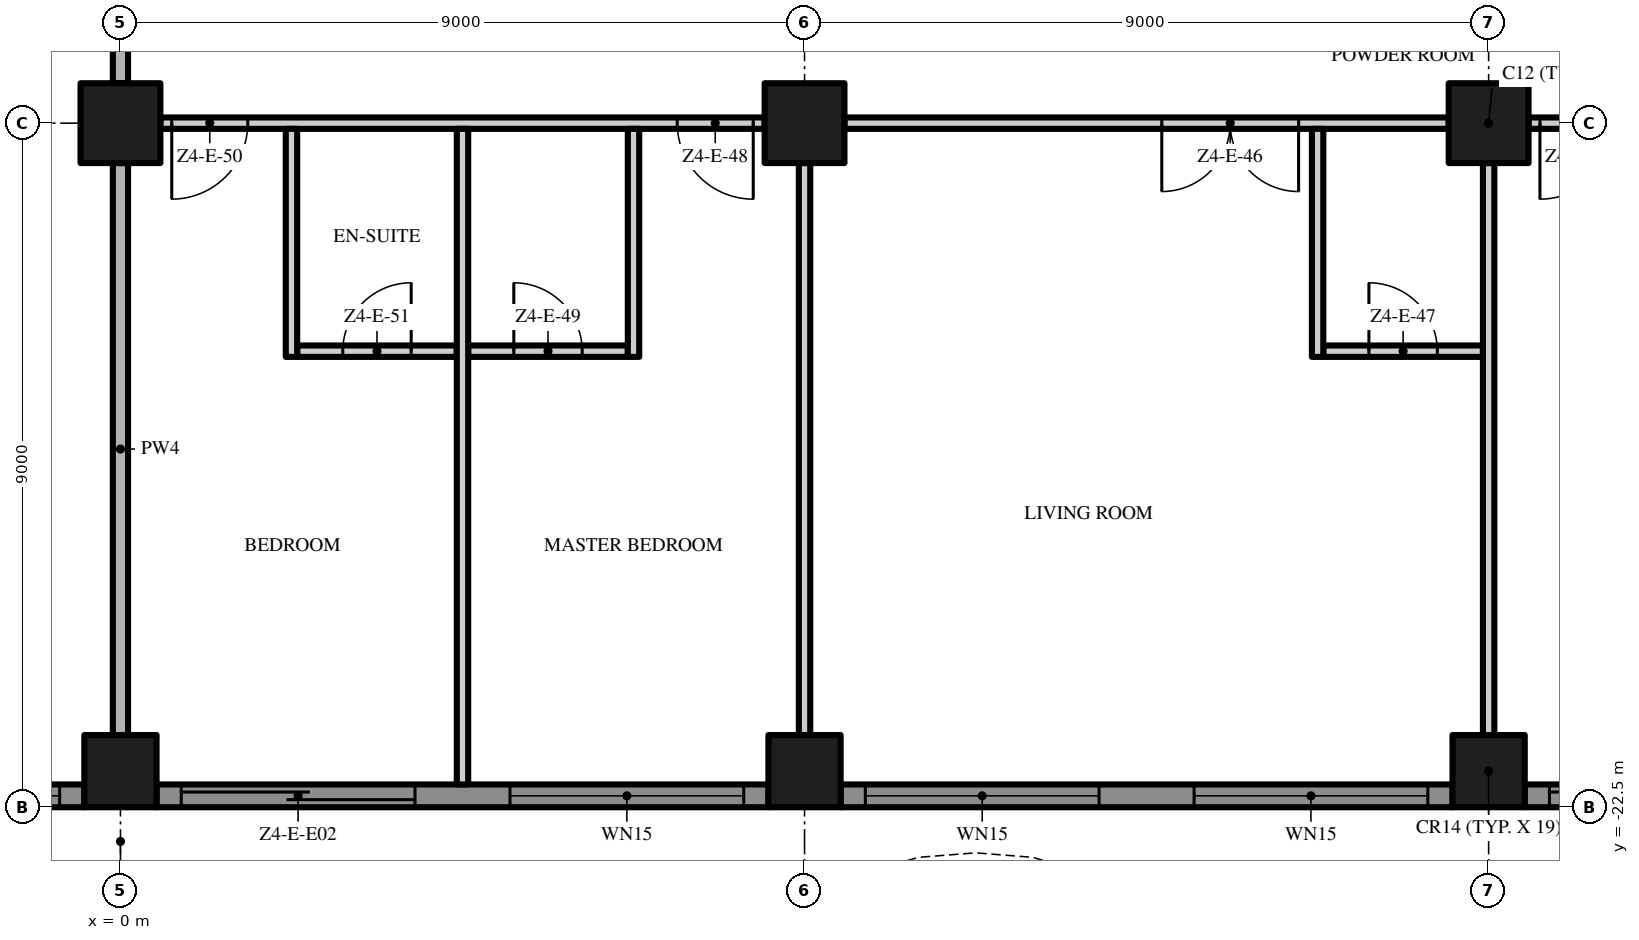
"""IFC4 building model, lengths in metres.
Left out: names, types, materials, properties, quantities, classifications, styles, units other than length and angle.
Written with IfcOpenShell. Run it as: python <this file> out.ifc"""

import sys

from ifc_helpers import new_model, si_unit, direction, frame, frame_2d, origin, origin_2d, place, context, subcontext, project, spatial, polyline, rectangle, outline, extrude, element, fill, save


model = new_model("IFC4")
c1 = context("Model", 3, precision=1e-05, world=origin(), true_north=direction((0.0, 1.0)))
c2 = subcontext(c1, "Body", "Model", "MODEL_VIEW")
j1 = project(units=[si_unit("LENGTHUNIT", "METRE"), si_unit("PLANEANGLEUNIT", "RADIAN")], contexts=[c1])
p1 = place(None, origin())
s1 = spatial("IfcSite", under=j1, at=p1, CompositionType="ELEMENT")
p2 = place(p1, origin())
s2 = spatial("IfcBuilding", under=s1, at=p2, CompositionType="ELEMENT")
p3 = place(p2, frame((0.0, 0.0, 226.2)))
s3 = spatial("IfcBuildingStorey", under=s2, at=p3, CompositionType="ELEMENT", Elevation=226.2)
p4 = place(p3, frame((0.0, -13.5, 0.0), z_axis=(0.0, 0.0, 1.0), x_axis=(1.0, 0.0, 0.0)))
e1 = element("IfcColumn", 1, at=p4, inside=s3, PredefinedType="COLUMN", context=c2, shape_type="SweptSolid", body=[
    extrude(rectangle(XDim=1.05, YDim=1.05, at=origin_2d()), origin(), (0.0, 0.0, 1.0), 3.5),
])
p5 = place(p3, frame((0.0, -22.025, 0.0), z_axis=(0.0, 0.0, 1.0), x_axis=(1.0, 0.0, 0.0)))
e2 = element("IfcColumn", 2, at=p5, inside=s3, PredefinedType="COLUMN", context=c2, shape_type="SweptSolid", body=[
    extrude(rectangle(XDim=0.95, YDim=0.95, at=origin_2d()), origin(), (0.0, 0.0, 1.0), 3.5),
])
p6 = place(p3, frame((18.0, -13.5, 0.0), z_axis=(0.0, 0.0, 1.0), x_axis=(1.0, 0.0, 0.0)))
e3 = element("IfcColumn", 3, at=p6, inside=s3, PredefinedType="COLUMN", context=c2, shape_type="SweptSolid", body=[
    extrude(rectangle(XDim=1.05, YDim=1.05, at=origin_2d()), origin(), (0.0, 0.0, 1.0), 3.5),
])
p7 = place(p3, frame((18.0, -22.025, 0.0), z_axis=(0.0, 0.0, 1.0), x_axis=(1.0, 0.0, 0.0)))
e4 = element("IfcColumn", 4, at=p7, inside=s3, PredefinedType="COLUMN", context=c2, shape_type="SweptSolid", body=[
    extrude(rectangle(XDim=0.95, YDim=0.95, at=origin_2d()), origin(), (0.0, 0.0, 1.0), 3.5),
])
p8 = place(p3, frame((9.0, -13.5, 0.0), z_axis=(0.0, 0.0, 1.0), x_axis=(1.0, 0.0, 0.0)))
e5 = element("IfcColumn", 5, at=p8, inside=s3, PredefinedType="COLUMN", context=c2, shape_type="SweptSolid", body=[
    extrude(rectangle(XDim=1.05, YDim=1.05, at=origin_2d()), origin(), (0.0, 0.0, 1.0), 3.5),
])
p9 = place(p3, frame((9.0, -22.025, 0.0), z_axis=(0.0, 0.0, 1.0), x_axis=(1.0, 0.0, 0.0)))
e6 = element("IfcColumn", 6, at=p9, inside=s3, PredefinedType="COLUMN", context=c2, shape_type="SweptSolid", body=[
    extrude(rectangle(XDim=0.95, YDim=0.95, at=origin_2d()), origin(), (0.0, 0.0, 1.0), 3.5),
])
p10 = place(p3, frame((-0.475, -22.35, 0.0), z_axis=(0.0, 0.0, 1.0), x_axis=(-1.0, 0.0, 0.0)))
e7 = element("IfcWall", 7, at=p10, inside=s3, PredefinedType="SOLIDWALL", context=c2, shape_type="SweptSolid", body=[
    extrude(rectangle(XDim=8.05, YDim=0.3, at=frame_2d((4.025, 0.0))), origin(), (0.0, 0.0, 1.0), 3.5),
])
p11 = place(p10, frame((4.65, 0.0, 0.45)))
e8 = element("IfcOpeningElement", 8, at=p11, cuts=e7, PredefinedType="OPENING", context=c2, shape_type="SweptSolid", body=[
    extrude(rectangle(XDim=3.075, YDim=2.65, at=frame_2d((1.538, 1.325))), frame((0.0, 0.16, 0.0), z_axis=(0.0, -1.0, 0.0), x_axis=(1.0, 0.0, 0.0)), (0.0, 0.0, 1.0), 0.32),
])
p12 = place(p10, frame((0.325, 0.0, 0.45)))
e9 = element("IfcOpeningElement", 9, at=p12, cuts=e7, PredefinedType="OPENING", context=c2, shape_type="SweptSolid", body=[
    extrude(rectangle(XDim=3.075, YDim=2.65, at=frame_2d((1.538, 1.325))), frame((0.0, 0.16, 0.0), z_axis=(0.0, -1.0, 0.0), x_axis=(1.0, 0.0, 0.0)), (0.0, 0.0, 1.0), 0.32),
])
p13 = place(p3, frame((8.525, -22.35, 0.0), z_axis=(0.0, 0.0, 1.0), x_axis=(-1.0, 0.0, 0.0)))
e10 = element("IfcWall", 10, at=p13, inside=s3, PredefinedType="SOLIDWALL", context=c2, shape_type="SweptSolid", body=[
    extrude(rectangle(XDim=8.05, YDim=0.3, at=frame_2d((4.025, 0.0))), origin(), (0.0, 0.0, 1.0), 3.5),
])
p14 = place(p13, frame((4.65, 0.0, 0.0)))
e11 = element("IfcOpeningElement", 11, at=p14, cuts=e10, PredefinedType="OPENING", context=c2, shape_type="SweptSolid", body=[
    extrude(rectangle(XDim=3.075, YDim=2.4, at=frame_2d((1.538, 1.2))), frame((0.0, 0.16, 0.0), z_axis=(0.0, -1.0, 0.0), x_axis=(1.0, 0.0, 0.0)), (0.0, 0.0, 1.0), 0.32),
])
p15 = place(p13, frame((0.325, 0.0, 0.45)))
e12 = element("IfcOpeningElement", 12, at=p15, cuts=e10, PredefinedType="OPENING", context=c2, shape_type="SweptSolid", body=[
    extrude(rectangle(XDim=3.075, YDim=2.65, at=frame_2d((1.538, 1.325))), frame((0.0, 0.16, 0.0), z_axis=(0.0, -1.0, 0.0), x_axis=(1.0, 0.0, 0.0)), (0.0, 0.0, 1.0), 0.32),
])
p16 = place(p3, frame((17.525, -22.35, 0.0), z_axis=(0.0, 0.0, 1.0), x_axis=(-1.0, 0.0, 0.0)))
e13 = element("IfcWall", 13, at=p16, inside=s3, PredefinedType="SOLIDWALL", context=c2, shape_type="SweptSolid", body=[
    extrude(rectangle(XDim=8.05, YDim=0.3, at=frame_2d((4.025, 0.0))), origin(), (0.0, 0.0, 1.0), 3.5),
])
p17 = place(p16, frame((4.65, 0.0, 0.45)))
e14 = element("IfcOpeningElement", 14, at=p17, cuts=e13, PredefinedType="OPENING", context=c2, shape_type="SweptSolid", body=[
    extrude(rectangle(XDim=3.075, YDim=2.65, at=frame_2d((1.538, 1.325))), frame((0.0, 0.16, 0.0), z_axis=(0.0, -1.0, 0.0), x_axis=(1.0, 0.0, 0.0)), (0.0, 0.0, 1.0), 0.32),
])
p18 = place(p16, frame((0.325, 0.0, 0.45)))
e15 = element("IfcOpeningElement", 15, at=p18, cuts=e13, PredefinedType="OPENING", context=c2, shape_type="SweptSolid", body=[
    extrude(rectangle(XDim=3.075, YDim=2.65, at=frame_2d((1.538, 1.325))), frame((0.0, 0.16, 0.0), z_axis=(0.0, -1.0, 0.0), x_axis=(1.0, 0.0, 0.0)), (0.0, 0.0, 1.0), 0.32),
])
p19 = place(p3, frame((22.5, -22.35, 0.0), z_axis=(0.0, 0.0, 1.0), x_axis=(-1.0, 0.0, 0.0)))
e16 = element("IfcWall", 16, at=p19, inside=s3, PredefinedType="SOLIDWALL", context=c2, shape_type="SweptSolid", body=[
    extrude(rectangle(XDim=4.025, YDim=0.3, at=frame_2d((2.013, 0.0))), origin(), (0.0, 0.0, 1.0), 3.5),
])
p20 = place(p19, frame((0.625, 0.0, 0.0)))
e17 = element("IfcOpeningElement", 17, at=p20, cuts=e16, PredefinedType="OPENING", context=c2, shape_type="SweptSolid", body=[
    extrude(rectangle(XDim=3.075, YDim=2.4, at=frame_2d((1.538, 1.2))), frame((0.0, 0.16, 0.0), z_axis=(0.0, -1.0, 0.0), x_axis=(1.0, 0.0, 0.0)), (0.0, 0.0, 1.0), 0.32),
])
p21 = place(p3, origin())
e18 = element("IfcWall", 18, at=p21, inside=s3, PredefinedType="USERDEFINED", context=c2, shape_type="SweptSolid", body=[
    extrude(outline(polyline([(-22.5, -24.3), (-21.0, -23.595), (-19.5, -23.159), (-18.75, -23.1), (-18.0, -23.159), (-16.5, -23.595), (-15.0, -24.3), (-13.5, -25.005), (-12.0, -25.441), (-11.25, -25.5), (-10.5, -25.441), (-9.0, -25.005), (-7.5, -24.3), (-6.0, -23.595), (-4.5, -23.159), (-3.75, -23.1), (-3.0, -23.159), (-1.5, -23.595), (0.0, -24.3), (1.5, -25.005), (3.0, -25.441), (3.75, -25.5), (4.5, -25.441), (6.0, -25.005), (7.5, -24.3), (9.0, -23.595), (10.5, -23.159), (11.25, -23.1), (12.0, -23.159), (13.5, -23.595), (15.0, -24.3), (16.5, -25.005), (18.0, -25.441), (18.75, -25.5), (19.5, -25.441), (21.0, -25.005), (22.5, -24.3), (22.394, -24.074), (20.911, -24.771), (19.455, -25.194), (18.75, -25.249), (18.045, -25.194), (16.589, -24.771), (15.106, -24.074), (13.589, -23.36), (12.045, -22.911), (11.25, -22.849), (10.455, -22.911), (8.911, -23.36), (7.394, -24.074), (5.911, -24.771), (4.455, -25.194), (3.75, -25.249), (3.045, -25.194), (1.589, -24.771), (0.106, -24.074), (-1.411, -23.36), (-2.955, -22.911), (-3.75, -22.849), (-4.545, -22.911), (-6.089, -23.36), (-7.606, -24.074), (-9.089, -24.771), (-10.545, -25.194), (-11.25, -25.249), (-11.955, -25.194), (-13.411, -24.771), (-14.894, -24.074), (-16.411, -23.36), (-17.955, -22.911), (-18.75, -22.849), (-19.545, -22.911), (-21.089, -23.36), (-22.606, -24.074), (-22.5, -24.3)])), origin(), (0.0, 0.0, 1.0), 0.9),
])
p22 = place(p3, frame((2.325, -16.5, 0.0), z_axis=(0.0, 0.0, 1.0), x_axis=(1.0, 0.0, 0.0)))
e19 = element("IfcWall", 19, at=p22, inside=s3, PredefinedType="PARTITIONING", context=c2, shape_type="SweptSolid", body=[
    extrude(rectangle(XDim=2.1, YDim=0.15, at=frame_2d((1.05, 0.0))), origin(), (0.0, 0.0, 1.0), 3.5),
])
p23 = place(p22, frame((0.6, 0.0, 0.0)))
e20 = element("IfcOpeningElement", 20, at=p23, cuts=e19, PredefinedType="OPENING", context=c2, shape_type="SweptSolid", body=[
    extrude(rectangle(XDim=0.9, YDim=2.1, at=frame_2d((0.45, 1.05))), frame((0.0, 0.085, 0.0), z_axis=(0.0, -1.0, 0.0), x_axis=(1.0, 0.0, 0.0)), (0.0, 0.0, 1.0), 0.17),
])
p24 = place(p3, frame((4.575, -16.5, 0.0), z_axis=(0.0, 0.0, 1.0), x_axis=(1.0, 0.0, 0.0)))
e21 = element("IfcWall", 21, at=p24, inside=s3, PredefinedType="PARTITIONING", context=c2, shape_type="SweptSolid", body=[
    extrude(rectangle(XDim=2.1, YDim=0.15, at=frame_2d((1.05, 0.0))), origin(), (0.0, 0.0, 1.0), 3.5),
])
p25 = place(p24, frame((0.6, 0.0, 0.0)))
e22 = element("IfcOpeningElement", 22, at=p25, cuts=e21, PredefinedType="OPENING", context=c2, shape_type="SweptSolid", body=[
    extrude(rectangle(XDim=0.9, YDim=2.1, at=frame_2d((0.45, 1.05))), frame((0.0, 0.085, 0.0), z_axis=(0.0, -1.0, 0.0), x_axis=(1.0, 0.0, 0.0)), (0.0, 0.0, 1.0), 0.17),
])
p26 = place(p3, frame((15.825, -16.5, 0.0), z_axis=(0.0, 0.0, 1.0), x_axis=(1.0, 0.0, 0.0)))
e23 = element("IfcWall", 23, at=p26, inside=s3, PredefinedType="PARTITIONING", context=c2, shape_type="SweptSolid", body=[
    extrude(rectangle(XDim=2.1, YDim=0.15, at=frame_2d((1.05, 0.0))), origin(), (0.0, 0.0, 1.0), 3.5),
])
p27 = place(p26, frame((0.6, 0.0, 0.0)))
e24 = element("IfcOpeningElement", 24, at=p27, cuts=e23, PredefinedType="OPENING", context=c2, shape_type="SweptSolid", body=[
    extrude(rectangle(XDim=0.9, YDim=2.1, at=frame_2d((0.45, 1.05))), frame((0.0, 0.085, 0.0), z_axis=(0.0, -1.0, 0.0), x_axis=(1.0, 0.0, 0.0)), (0.0, 0.0, 1.0), 0.17),
])
p28 = place(p3, frame((8.475, -13.5, 0.0), z_axis=(0.0, 0.0, 1.0), x_axis=(-1.0, 0.0, 0.0)))
e25 = element("IfcWall", 25, at=p28, inside=s3, PredefinedType="PARTITIONING", context=c2, shape_type="SweptSolid", body=[
    extrude(rectangle(XDim=7.95, YDim=0.15, at=frame_2d((3.975, 0.0))), origin(), (0.0, 0.0, 1.0), 3.5),
])
p29 = place(p28, frame((0.15, 0.0, 0.0)))
e26 = element("IfcOpeningElement", 26, at=p29, cuts=e25, PredefinedType="OPENING", context=c2, shape_type="SweptSolid", body=[
    extrude(rectangle(XDim=1.0, YDim=2.4, at=frame_2d((0.5, 1.2))), frame((0.0, 0.085, 0.0), z_axis=(0.0, -1.0, 0.0), x_axis=(1.0, 0.0, 0.0)), (0.0, 0.0, 1.0), 0.17),
])
p30 = place(p28, frame((6.8, 0.0, 0.0)))
e27 = element("IfcOpeningElement", 27, at=p30, cuts=e25, PredefinedType="OPENING", context=c2, shape_type="SweptSolid", body=[
    extrude(rectangle(XDim=1.0, YDim=2.4, at=frame_2d((0.5, 1.2))), frame((0.0, 0.085, 0.0), z_axis=(0.0, -1.0, 0.0), x_axis=(1.0, 0.0, 0.0)), (0.0, 0.0, 1.0), 0.17),
])
p31 = place(p3, frame((17.475, -13.5, 0.0), z_axis=(0.0, 0.0, 1.0), x_axis=(-1.0, 0.0, 0.0)))
e28 = element("IfcWall", 28, at=p31, inside=s3, PredefinedType="PARTITIONING", context=c2, shape_type="SweptSolid", body=[
    extrude(rectangle(XDim=7.95, YDim=0.15, at=frame_2d((3.975, 0.0))), origin(), (0.0, 0.0, 1.0), 3.5),
])
p32 = place(p31, frame((1.975, 0.0, 0.0)))
e29 = element("IfcOpeningElement", 29, at=p32, cuts=e28, PredefinedType="OPENING", context=c2, shape_type="SweptSolid", body=[
    extrude(rectangle(XDim=1.8, YDim=2.4, at=frame_2d((0.9, 1.2))), frame((0.0, 0.085, 0.0), z_axis=(0.0, -1.0, 0.0), x_axis=(1.0, 0.0, 0.0)), (0.0, 0.0, 1.0), 0.17),
])
p33 = place(p3, frame((26.05, -13.5, 0.0), z_axis=(0.0, 0.0, 1.0), x_axis=(-1.0, 0.0, 0.0)))
e30 = element("IfcWall", 30, at=p33, inside=s3, PredefinedType="PARTITIONING", context=c2, shape_type="SweptSolid", body=[
    extrude(rectangle(XDim=7.525, YDim=0.15, at=frame_2d((3.763, 0.0))), origin(), (0.0, 0.0, 1.0), 3.5),
])
p34 = place(p33, frame((0.8, 0.0, 0.0)))
e31 = element("IfcOpeningElement", 31, at=p34, cuts=e30, PredefinedType="OPENING", context=c2, shape_type="SweptSolid", body=[
    extrude(rectangle(XDim=1.0, YDim=2.4, at=frame_2d((0.5, 1.2))), frame((0.0, 0.085, 0.0), z_axis=(0.0, -1.0, 0.0), x_axis=(1.0, 0.0, 0.0)), (0.0, 0.0, 1.0), 0.17),
])
p35 = place(p33, frame((6.375, 0.0, 0.0)))
e32 = element("IfcOpeningElement", 32, at=p35, cuts=e30, PredefinedType="OPENING", context=c2, shape_type="SweptSolid", body=[
    extrude(rectangle(XDim=1.0, YDim=2.4, at=frame_2d((0.5, 1.2))), frame((0.0, 0.085, 0.0), z_axis=(0.0, -1.0, 0.0), x_axis=(1.0, 0.0, 0.0)), (0.0, 0.0, 1.0), 0.17),
])
p36 = place(p3, frame((0.0, -21.55, 0.0), z_axis=(0.0, 0.0, 1.0), x_axis=(0.0, 1.0, 0.0)))
e33 = element("IfcWall", 33, at=p36, inside=s3, PredefinedType="PARTITIONING", context=c2, shape_type="SweptSolid", body=[
    extrude(rectangle(XDim=7.525, YDim=0.2, at=frame_2d((3.763, 0.0))), origin(), (0.0, 0.0, 1.0), 3.5),
])
p37 = place(p3, frame((0.0, -12.975, 0.0), z_axis=(0.0, 0.0, 1.0), x_axis=(0.0, 1.0, 0.0)))
e34 = element("IfcWall", 34, at=p37, inside=s3, PredefinedType="PARTITIONING", context=c2, shape_type="SweptSolid", body=[
    extrude(rectangle(XDim=7.95, YDim=0.2, at=frame_2d((3.975, 0.0))), origin(), (0.0, 0.0, 1.0), 3.5),
])
p38 = place(p3, frame((2.25, -16.575, 0.0), z_axis=(0.0, 0.0, 1.0), x_axis=(0.0, 1.0, 0.0)))
e35 = element("IfcWall", 35, at=p38, inside=s3, PredefinedType="PARTITIONING", context=c2, shape_type="SweptSolid", body=[
    extrude(rectangle(XDim=3.0, YDim=0.15, at=frame_2d((1.5, 0.0))), origin(), (0.0, 0.0, 1.0), 3.5),
])
p39 = place(p3, frame((4.5, -22.2, 0.0), z_axis=(0.0, 0.0, 1.0), x_axis=(0.0, 1.0, 0.0)))
e36 = element("IfcWall", 36, at=p39, inside=s3, PredefinedType="PARTITIONING", context=c2, shape_type="SweptSolid", body=[
    extrude(rectangle(XDim=8.625, YDim=0.15, at=frame_2d((4.312, 0.0))), origin(), (0.0, 0.0, 1.0), 3.5),
])
p40 = place(p3, frame((6.75, -16.575, 0.0), z_axis=(0.0, 0.0, 1.0), x_axis=(0.0, 1.0, 0.0)))
e37 = element("IfcWall", 37, at=p40, inside=s3, PredefinedType="PARTITIONING", context=c2, shape_type="SweptSolid", body=[
    extrude(rectangle(XDim=3.0, YDim=0.15, at=frame_2d((1.5, 0.0))), origin(), (0.0, 0.0, 1.0), 3.5),
])
p41 = place(p3, frame((9.0, -21.55, 0.0), z_axis=(0.0, 0.0, 1.0), x_axis=(0.0, 1.0, 0.0)))
e38 = element("IfcWall", 38, at=p41, inside=s3, PredefinedType="PARTITIONING", context=c2, shape_type="SweptSolid", body=[
    extrude(rectangle(XDim=7.525, YDim=0.15, at=frame_2d((3.763, 0.0))), origin(), (0.0, 0.0, 1.0), 3.5),
])
p42 = place(p3, frame((15.75, -16.575, 0.0), z_axis=(0.0, 0.0, 1.0), x_axis=(0.0, 1.0, 0.0)))
e39 = element("IfcWall", 39, at=p42, inside=s3, PredefinedType="PARTITIONING", context=c2, shape_type="SweptSolid", body=[
    extrude(rectangle(XDim=3.0, YDim=0.15, at=frame_2d((1.5, 0.0))), origin(), (0.0, 0.0, 1.0), 3.5),
])
p43 = place(p3, frame((18.0, -21.55, 0.0), z_axis=(0.0, 0.0, 1.0), x_axis=(0.0, 1.0, 0.0)))
e40 = element("IfcWall", 40, at=p43, inside=s3, PredefinedType="PARTITIONING", context=c2, shape_type="SweptSolid", body=[
    extrude(rectangle(XDim=7.525, YDim=0.15, at=frame_2d((3.763, 0.0))), origin(), (0.0, 0.0, 1.0), 3.5),
])
p44 = place(p12, origin())
e41 = element("IfcWindow", 41, at=p44, inside=s3, PartitioningType="SINGLE_PANEL", PredefinedType="WINDOW", context=c2, shape_type="SweptSolid", body=[
    extrude(rectangle(XDim=3.075, YDim=2.65, at=frame_2d((1.538, 1.325))), frame((0.0, 0.03, 0.0), z_axis=(0.0, -1.0, 0.0), x_axis=(1.0, 0.0, 0.0)), (0.0, 0.0, 1.0), 0.06),
])
fill(e9, e41)
p45 = place(p14, origin())
e42 = element("IfcDoor", 42, at=p45, inside=s3, OperationType="SINGLE_SWING_LEFT", PredefinedType="DOOR", context=c2, shape_type="SweptSolid", body=[
    extrude(rectangle(XDim=3.075, YDim=2.4, at=frame_2d((1.538, 1.2))), frame((0.0, 0.025, 0.0), z_axis=(0.0, -1.0, 0.0), x_axis=(1.0, 0.0, 0.0)), (0.0, 0.0, 1.0), 0.05),
])
fill(e11, e42)
p46 = place(p15, origin())
e43 = element("IfcWindow", 43, at=p46, inside=s3, PartitioningType="SINGLE_PANEL", PredefinedType="WINDOW", context=c2, shape_type="SweptSolid", body=[
    extrude(rectangle(XDim=3.075, YDim=2.65, at=frame_2d((1.538, 1.325))), frame((0.0, 0.03, 0.0), z_axis=(0.0, -1.0, 0.0), x_axis=(1.0, 0.0, 0.0)), (0.0, 0.0, 1.0), 0.06),
])
fill(e12, e43)
p47 = place(p17, origin())
e44 = element("IfcWindow", 44, at=p47, inside=s3, PartitioningType="SINGLE_PANEL", PredefinedType="WINDOW", context=c2, shape_type="SweptSolid", body=[
    extrude(rectangle(XDim=3.075, YDim=2.65, at=frame_2d((1.538, 1.325))), frame((0.0, 0.03, 0.0), z_axis=(0.0, -1.0, 0.0), x_axis=(1.0, 0.0, 0.0)), (0.0, 0.0, 1.0), 0.06),
])
fill(e14, e44)
p48 = place(p18, origin())
e45 = element("IfcWindow", 45, at=p48, inside=s3, PartitioningType="SINGLE_PANEL", PredefinedType="WINDOW", context=c2, shape_type="SweptSolid", body=[
    extrude(rectangle(XDim=3.075, YDim=2.65, at=frame_2d((1.538, 1.325))), frame((0.0, 0.03, 0.0), z_axis=(0.0, -1.0, 0.0), x_axis=(1.0, 0.0, 0.0)), (0.0, 0.0, 1.0), 0.06),
])
fill(e15, e45)
p49 = place(p20, origin())
e46 = element("IfcDoor", 46, at=p49, inside=s3, OperationType="SINGLE_SWING_LEFT", PredefinedType="DOOR", context=c2, shape_type="SweptSolid", body=[
    extrude(rectangle(XDim=3.075, YDim=2.4, at=frame_2d((1.538, 1.2))), frame((0.0, 0.025, 0.0), z_axis=(0.0, -1.0, 0.0), x_axis=(1.0, 0.0, 0.0)), (0.0, 0.0, 1.0), 0.05),
])
fill(e17, e46)
p50 = place(p35, origin())
e47 = element("IfcDoor", 47, at=p50, inside=s3, OperationType="SINGLE_SWING_RIGHT", PredefinedType="DOOR", context=c2, shape_type="SweptSolid", body=[
    extrude(rectangle(XDim=1.0, YDim=2.4, at=frame_2d((0.5, 1.2))), frame((0.0, 0.025, 0.0), z_axis=(0.0, -1.0, 0.0), x_axis=(1.0, 0.0, 0.0)), (0.0, 0.0, 1.0), 0.05),
])
fill(e32, e47)
p51 = place(p32, origin())
e48 = element("IfcDoor", 48, at=p51, inside=s3, OperationType="DOUBLE_DOOR_SINGLE_SWING", PredefinedType="DOOR", context=c2, shape_type="SweptSolid", body=[
    extrude(rectangle(XDim=1.8, YDim=2.4, at=frame_2d((0.9, 1.2))), frame((0.0, 0.025, 0.0), z_axis=(0.0, -1.0, 0.0), x_axis=(1.0, 0.0, 0.0)), (0.0, 0.0, 1.0), 0.05),
])
fill(e29, e48)
p52 = place(p27, origin())
e49 = element("IfcDoor", 49, at=p52, inside=s3, OperationType="SINGLE_SWING_LEFT", PredefinedType="DOOR", context=c2, shape_type="SweptSolid", body=[
    extrude(rectangle(XDim=0.9, YDim=2.1, at=frame_2d((0.45, 1.05))), frame((0.0, 0.025, 0.0), z_axis=(0.0, -1.0, 0.0), x_axis=(1.0, 0.0, 0.0)), (0.0, 0.0, 1.0), 0.05),
])
fill(e24, e49)
p53 = place(p29, origin())
e50 = element("IfcDoor", 50, at=p53, inside=s3, OperationType="SINGLE_SWING_LEFT", PredefinedType="DOOR", context=c2, shape_type="SweptSolid", body=[
    extrude(rectangle(XDim=1.0, YDim=2.4, at=frame_2d((0.5, 1.2))), frame((0.0, 0.025, 0.0), z_axis=(0.0, -1.0, 0.0), x_axis=(1.0, 0.0, 0.0)), (0.0, 0.0, 1.0), 0.05),
])
fill(e26, e50)
p54 = place(p25, origin())
e51 = element("IfcDoor", 51, at=p54, inside=s3, OperationType="SINGLE_SWING_LEFT", PredefinedType="DOOR", context=c2, shape_type="SweptSolid", body=[
    extrude(rectangle(XDim=0.9, YDim=2.1, at=frame_2d((0.45, 1.05))), frame((0.0, 0.025, 0.0), z_axis=(0.0, -1.0, 0.0), x_axis=(1.0, 0.0, 0.0)), (0.0, 0.0, 1.0), 0.05),
])
fill(e22, e51)
p55 = place(p30, origin())
e52 = element("IfcDoor", 52, at=p55, inside=s3, OperationType="SINGLE_SWING_RIGHT", PredefinedType="DOOR", context=c2, shape_type="SweptSolid", body=[
    extrude(rectangle(XDim=1.0, YDim=2.4, at=frame_2d((0.5, 1.2))), frame((0.0, 0.025, 0.0), z_axis=(0.0, -1.0, 0.0), x_axis=(1.0, 0.0, 0.0)), (0.0, 0.0, 1.0), 0.05),
])
fill(e27, e52)
p56 = place(p23, origin())
e53 = element("IfcDoor", 53, at=p56, inside=s3, OperationType="SINGLE_SWING_RIGHT", PredefinedType="DOOR", context=c2, shape_type="SweptSolid", body=[
    extrude(rectangle(XDim=0.9, YDim=2.1, at=frame_2d((0.45, 1.05))), frame((0.0, 0.025, 0.0), z_axis=(0.0, -1.0, 0.0), x_axis=(1.0, 0.0, 0.0)), (0.0, 0.0, 1.0), 0.05),
])
fill(e20, e53)
save(model, sys.argv[1])
